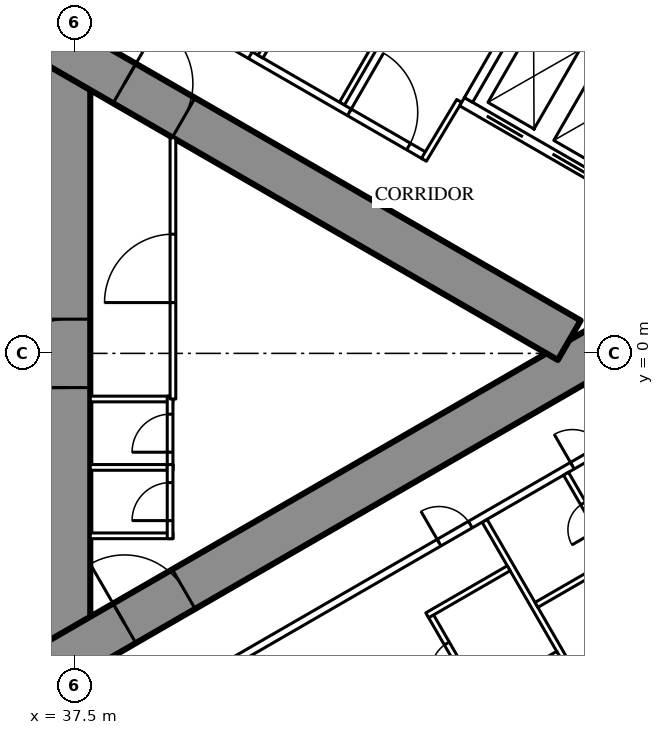
"""IFC4 building model, lengths in metres.
Left out: names, types, materials, properties, quantities, classifications, styles, units other than length and angle.
Written with IfcOpenShell. Run it as: python <this file> out.ifc"""

import sys

from ifc_helpers import new_model, si_unit, direction, frame, frame_2d, origin, place, context, subcontext, project, spatial, rectangle, extrude, element, fill, save


model = new_model("IFC4")
c1 = context("Model", 3, precision=1e-05, world=origin(), true_north=direction((0.0, 1.0)))
c2 = subcontext(c1, "Body", "Model", "MODEL_VIEW")
j1 = project(units=[si_unit("LENGTHUNIT", "METRE"), si_unit("PLANEANGLEUNIT", "RADIAN")], contexts=[c1])
p1 = place(None, origin())
s1 = spatial("IfcSite", under=j1, at=p1, CompositionType="ELEMENT")
p2 = place(p1, origin())
s2 = spatial("IfcBuilding", under=s1, at=p2, CompositionType="ELEMENT")
p3 = place(p2, frame((0.0, 0.0, 159.8)))
s3 = spatial("IfcBuildingStorey", under=s2, at=p3, CompositionType="ELEMENT", Elevation=159.8)
p4 = place(p3, frame((37.3, -8.6, 0.0), z_axis=(0.0, 0.0, 1.0), x_axis=(0.0, 1.0, 0.0)))
e1 = element("IfcWall", 1, at=p4, inside=s3, PredefinedType="SHEAR", context=c2, shape_type="SweptSolid", body=[
    extrude(rectangle(XDim=17.2, YDim=1.2, at=frame_2d((8.6, 0.0))), origin(), (0.0, 0.0, 1.0), 3.5),
])
p5 = place(p4, frame((7.7, 0.0, 0.0)))
e2 = element("IfcOpeningElement", 2, at=p5, cuts=e1, PredefinedType="OPENING", context=c2, shape_type="SweptSolid", body=[
    extrude(rectangle(XDim=1.8, YDim=2.2, at=frame_2d((0.9, 1.1))), frame((0.0, 0.61, 0.0), z_axis=(0.0, -1.0, 0.0), x_axis=(1.0, 0.0, 0.0)), (0.0, 0.0, 1.0), 1.22),
])
p6 = place(p3, frame((27.2, -13.8, 0.0), z_axis=(0.0, 0.0, 1.0), x_axis=(0.866027159892, 0.499996958321, 0.0)))
e3 = element("IfcWall", 3, at=p6, inside=s3, PredefinedType="SHEAR", context=c2, shape_type="SweptSolid", body=[
    extrude(rectangle(XDim=27.947, YDim=1.2, at=frame_2d((13.973, 0.0))), origin(), (0.0, 0.0, 1.0), 3.5),
])
p7 = place(p6, frame((4.6, 0.0, 0.0)))
e4 = element("IfcOpeningElement", 4, at=p7, cuts=e3, PredefinedType="OPENING", context=c2, shape_type="SweptSolid", body=[
    extrude(rectangle(XDim=1.0, YDim=2.2, at=frame_2d((0.5, 1.1))), frame((0.0, 0.61, 0.0), z_axis=(0.0, -1.0, 0.0), x_axis=(1.0, 0.0, 0.0)), (0.0, 0.0, 1.0), 1.22),
])
p8 = place(p6, frame((13.395, 0.0, 0.0)))
e5 = element("IfcOpeningElement", 5, at=p8, cuts=e3, PredefinedType="OPENING", context=c2, shape_type="SweptSolid", body=[
    extrude(rectangle(XDim=1.8, YDim=2.2, at=frame_2d((0.9, 1.1))), frame((0.0, 0.61, 0.0), z_axis=(0.0, -1.0, 0.0), x_axis=(1.0, 0.0, 0.0)), (0.0, 0.0, 1.0), 1.22),
])
p9 = place(p3, frame((27.2, 13.8, 0.0), z_axis=(0.0, 0.0, 1.0), x_axis=(0.866024515034, -0.500001539357, 0.0)))
e6 = element("IfcWall", 6, at=p9, inside=s3, PredefinedType="SHEAR", context=c2, shape_type="SweptSolid", body=[
    extrude(rectangle(XDim=26.907, YDim=1.2, at=frame_2d((13.454, 0.0))), origin(), (0.0, 0.0, 1.0), 3.5),
])
p10 = place(p9, frame((4.6, 0.0, 0.0)))
e7 = element("IfcOpeningElement", 7, at=p10, cuts=e6, PredefinedType="OPENING", context=c2, shape_type="SweptSolid", body=[
    extrude(rectangle(XDim=1.0, YDim=2.2, at=frame_2d((0.5, 1.1))), frame((0.0, 0.61, 0.0), z_axis=(0.0, -1.0, 0.0), x_axis=(1.0, 0.0, 0.0)), (0.0, 0.0, 1.0), 1.22),
])
p11 = place(p9, frame((13.395, 0.0, 0.0)))
e8 = element("IfcOpeningElement", 8, at=p11, cuts=e6, PredefinedType="OPENING", context=c2, shape_type="SweptSolid", body=[
    extrude(rectangle(XDim=1.8, YDim=2.2, at=frame_2d((0.9, 1.1))), frame((0.0, 0.61, 0.0), z_axis=(0.0, -1.0, 0.0), x_axis=(1.0, 0.0, 0.0)), (0.0, 0.0, 1.0), 1.22),
])
p12 = place(p3, frame((48.275, -4.404, 0.0), z_axis=(0.0, 0.0, 1.0), x_axis=(0.500006004368, -0.866021937133, 0.0)))
e9 = element("IfcWall", 9, at=p12, inside=s3, PredefinedType="PARTITIONING", context=c2, shape_type="SweptSolid", body=[
    extrude(rectangle(XDim=7.279, YDim=0.15, at=frame_2d((3.64, 0.0))), origin(), (0.0, 0.0, 1.0), 2.3),
])
p13 = place(p3, frame((44.521, 6.571, 0.0), z_axis=(0.0, 0.0, 1.0), x_axis=(0.500020376429, 0.866013639128, 0.0)))
e10 = element("IfcWall", 10, at=p13, inside=s3, PredefinedType="PARTITIONING", context=c2, shape_type="SweptSolid", body=[
    extrude(rectangle(XDim=7.306, YDim=0.15, at=frame_2d((3.653, 0.0))), origin(), (0.0, 0.0, 1.0), 2.3),
])
p14 = place(p3, frame((36.834, 10.894, 0.0), z_axis=(0.0, 0.0, 1.0), x_axis=(0.866031655879, -0.499989170898, 0.0)))
e11 = element("IfcWall", 11, at=p14, inside=s3, PredefinedType="PARTITIONING", context=c2, shape_type="SweptSolid", body=[
    extrude(rectangle(XDim=11.41, YDim=0.2, at=frame_2d((5.705, 0.0))), origin(), (0.0, 0.0, 1.0), 3.25),
])
p15 = place(p14, frame((5.144, 0.0, 0.0)))
e12 = element("IfcOpeningElement", 12, at=p15, cuts=e11, PredefinedType="OPENING", context=c2, shape_type="SweptSolid", body=[
    extrude(rectangle(XDim=0.95, YDim=2.2, at=frame_2d((0.475, 1.1))), frame((0.0, 0.11, 0.0), z_axis=(0.0, -1.0, 0.0), x_axis=(1.0, 0.0, 0.0)), (0.0, 0.0, 1.0), 0.22),
])
p16 = place(p14, frame((3.161, 0.0, 0.0)))
e13 = element("IfcOpeningElement", 13, at=p16, cuts=e11, PredefinedType="OPENING", context=c2, shape_type="SweptSolid", body=[
    extrude(rectangle(XDim=0.95, YDim=2.2, at=frame_2d((0.475, 1.1))), frame((0.0, 0.11, 0.0), z_axis=(0.0, -1.0, 0.0), x_axis=(1.0, 0.0, 0.0)), (0.0, 0.0, 1.0), 0.22),
])
p17 = place(p14, frame((9.102, 0.0, 0.0)))
e14 = element("IfcOpeningElement", 14, at=p17, cuts=e11, PredefinedType="OPENING", context=c2, shape_type="SweptSolid", body=[
    extrude(rectangle(XDim=1.8, YDim=2.2, at=frame_2d((0.9, 1.1))), frame((0.0, 0.11, 0.0), z_axis=(0.0, -1.0, 0.0), x_axis=(1.0, 0.0, 0.0)), (0.0, 0.0, 1.0), 0.22),
])
p18 = place(p3, frame((47.606, 6.643, 0.0), z_axis=(0.0, 0.0, 1.0), x_axis=(-0.514237157483, -0.857648031458, 0.0)))
e15 = element("IfcWall", 15, at=p18, inside=s3, PredefinedType="PARTITIONING", context=c2, shape_type="SweptSolid", body=[
    extrude(rectangle(XDim=1.805, YDim=0.15, at=frame_2d((0.902, 0.0))), origin(), (0.0, 0.0, 1.0), 3.25),
])
p19 = place(p3, frame((40.741, -8.638, 0.0), z_axis=(0.0, 0.0, 1.0), x_axis=(0.866022967338, 0.500004220025, 0.0)))
e16 = element("IfcWall", 16, at=p19, inside=s3, PredefinedType="PARTITIONING", context=c2, shape_type="SweptSolid", body=[
    extrude(rectangle(XDim=17.276, YDim=0.2, at=frame_2d((8.638, 0.0))), origin(), (0.0, 0.0, 1.0), 3.25),
])
p20 = place(p19, frame((7.316, 0.0, 0.0)))
e17 = element("IfcOpeningElement", 17, at=p20, cuts=e16, PredefinedType="OPENING", context=c2, shape_type="SweptSolid", body=[
    extrude(rectangle(XDim=0.95, YDim=2.2, at=frame_2d((0.475, 1.1))), frame((0.0, 0.11, 0.0), z_axis=(0.0, -1.0, 0.0), x_axis=(1.0, 0.0, 0.0)), (0.0, 0.0, 1.0), 0.22),
])
p21 = place(p19, frame((11.366, 0.0, 0.0)))
e18 = element("IfcOpeningElement", 18, at=p21, cuts=e16, PredefinedType="OPENING", context=c2, shape_type="SweptSolid", body=[
    extrude(rectangle(XDim=0.95, YDim=2.2, at=frame_2d((0.475, 1.1))), frame((0.0, 0.11, 0.0), z_axis=(0.0, -1.0, 0.0), x_axis=(1.0, 0.0, 0.0)), (0.0, 0.0, 1.0), 0.22),
])
p22 = place(p19, frame((13.347, 0.0, 0.0)))
e19 = element("IfcOpeningElement", 19, at=p22, cuts=e16, PredefinedType="OPENING", context=c2, shape_type="SweptSolid", body=[
    extrude(rectangle(XDim=0.95, YDim=2.2, at=frame_2d((0.475, 1.1))), frame((0.0, 0.11, 0.0), z_axis=(0.0, -1.0, 0.0), x_axis=(1.0, 0.0, 0.0)), (0.0, 0.0, 1.0), 0.22),
])
p23 = place(p3, frame((48.066, -9.143, 0.0), z_axis=(0.0, 0.0, 1.0), x_axis=(0.866006523861, 0.500032699561, 0.0)))
e20 = element("IfcWall", 20, at=p23, inside=s3, PredefinedType="PARTITIONING", context=c2, shape_type="SweptSolid", body=[
    extrude(rectangle(XDim=2.475, YDim=0.15, at=frame_2d((1.237, 0.0))), origin(), (0.0, 0.0, 1.0), 3.25),
])
p24 = place(p3, frame((46.831, -6.854, 0.0), z_axis=(0.0, 0.0, 1.0), x_axis=(0.500006934395, -0.866021400173, 0.0)))
e21 = element("IfcWall", 21, at=p24, inside=s3, PredefinedType="PARTITIONING", context=c2, shape_type="SweptSolid", body=[
    extrude(rectangle(XDim=2.6, YDim=0.15, at=frame_2d((1.3, 0.0))), origin(), (0.0, 0.0, 1.0), 3.25),
])
p25 = place(p24, frame((0.9, 0.0, 0.0)))
e22 = element("IfcOpeningElement", 22, at=p25, cuts=e21, PredefinedType="OPENING", context=c2, shape_type="SweptSolid", body=[
    extrude(rectangle(XDim=0.8, YDim=2.2, at=frame_2d((0.4, 1.1))), frame((0.0, 0.085, 0.0), z_axis=(0.0, -1.0, 0.0), x_axis=(1.0, 0.0, 0.0)), (0.0, 0.0, 1.0), 0.17),
])
for number, where, z_axis, x_axis in (
    (23, (46.766, -6.891, 0.0), (0.0, 0.0, 1.0), (0.866, 0.5, 0.0)),
    (24, (49.64, -6.618, 0.0), (0.0, 0.0, 1.0), (0.866, 0.5, 0.0)),
):
    element("IfcWall", number, at=place(p3, frame(where, z_axis=z_axis, x_axis=x_axis)), inside=s3, PredefinedType="PARTITIONING", context=c2, shape_type="SweptSolid", body=[
        extrude(rectangle(XDim=2.475, YDim=0.15, at=frame_2d((1.237, 0.0))), origin(), (0.0, 0.0, 1.0), 3.25),
    ])
p26 = place(p3, frame((50.418, -3.166, 0.0), z_axis=(0.0, 0.0, 1.0), x_axis=(0.499936506574, -0.866062058628, 0.0)))
e25 = element("IfcWall", 25, at=p26, inside=s3, PredefinedType="PARTITIONING", context=c2, shape_type="SweptSolid", body=[
    extrude(rectangle(XDim=2.6, YDim=0.15, at=frame_2d((1.3, 0.0))), origin(), (0.0, 0.0, 1.0), 3.25),
])
p27 = place(p26, frame((0.9, 0.0, 0.0)))
e26 = element("IfcOpeningElement", 26, at=p27, cuts=e25, PredefinedType="OPENING", context=c2, shape_type="SweptSolid", body=[
    extrude(rectangle(XDim=0.8, YDim=2.2, at=frame_2d((0.4, 1.1))), frame((0.0, 0.085, 0.0), z_axis=(0.0, -1.0, 0.0), x_axis=(1.0, 0.0, 0.0)), (0.0, 0.0, 1.0), 0.17),
])
p28 = place(p3, frame((42.378, 7.808, 0.0), z_axis=(0.0, 0.0, 1.0), x_axis=(0.500006934395, 0.866021400173, 0.0)))
e27 = element("IfcWall", 27, at=p28, inside=s3, PredefinedType="PARTITIONING", context=c2, shape_type="SweptSolid", body=[
    extrude(rectangle(XDim=2.6, YDim=0.15, at=frame_2d((1.3, 0.0))), origin(), (0.0, 0.0, 1.0), 3.25),
])
p29 = place(p28, frame((0.9, 0.0, 0.0)))
e28 = element("IfcOpeningElement", 28, at=p29, cuts=e27, PredefinedType="OPENING", context=c2, shape_type="SweptSolid", body=[
    extrude(rectangle(XDim=0.8, YDim=2.2, at=frame_2d((0.4, 1.1))), frame((0.0, 0.085, 0.0), z_axis=(0.0, -1.0, 0.0), x_axis=(1.0, 0.0, 0.0)), (0.0, 0.0, 1.0), 0.17),
])
for number, where, z_axis, x_axis in (
    (29, (37.9, -1.2, 0.0), (0.0, 0.0, 1.0), (1.0, 0.0, 0.0)),
    (30, (37.9, -3.0, 0.0), (0.0, 0.0, 1.0), (1.0, 0.0, 0.0)),
    (31, (37.9, -4.8, 0.0), (0.0, 0.0, 1.0), (1.0, 0.0, 0.0)),
):
    element("IfcWall", number, at=place(p3, frame(where, z_axis=z_axis, x_axis=x_axis)), inside=s3, PredefinedType="PARTITIONING", context=c2, shape_type="SweptSolid", body=[
        extrude(rectangle(XDim=2.175, YDim=0.15, at=frame_2d((1.087, 0.0))), origin(), (0.0, 0.0, 1.0), 3.25),
    ])
p30 = place(p3, frame((40.0, -3.075, 0.0), z_axis=(0.0, 0.0, 1.0), x_axis=(0.0, 1.0, 0.0)))
e32 = element("IfcWall", 32, at=p30, inside=s3, PredefinedType="PARTITIONING", context=c2, shape_type="SweptSolid", body=[
    extrude(rectangle(XDim=1.95, YDim=0.15, at=frame_2d((0.975, 0.0))), origin(), (0.0, 0.0, 1.0), 3.25),
])
p31 = place(p30, frame((0.475, 0.0, 0.0)))
e33 = element("IfcOpeningElement", 33, at=p31, cuts=e32, PredefinedType="OPENING", context=c2, shape_type="SweptSolid", body=[
    extrude(rectangle(XDim=1.0, YDim=2.2, at=frame_2d((0.5, 1.1))), frame((0.0, 0.085, 0.0), z_axis=(0.0, -1.0, 0.0), x_axis=(1.0, 0.0, 0.0)), (0.0, 0.0, 1.0), 0.17),
])
p32 = place(p3, frame((40.0, -4.875, 0.0), z_axis=(0.0, 0.0, 1.0), x_axis=(0.0, 1.0, 0.0)))
e34 = element("IfcWall", 34, at=p32, inside=s3, PredefinedType="PARTITIONING", context=c2, shape_type="SweptSolid", body=[
    extrude(rectangle(XDim=1.95, YDim=0.15, at=frame_2d((0.975, 0.0))), origin(), (0.0, 0.0, 1.0), 3.25),
])
p33 = place(p32, frame((0.475, 0.0, 0.0)))
e35 = element("IfcOpeningElement", 35, at=p33, cuts=e34, PredefinedType="OPENING", context=c2, shape_type="SweptSolid", body=[
    extrude(rectangle(XDim=1.0, YDim=2.2, at=frame_2d((0.5, 1.1))), frame((0.0, 0.085, 0.0), z_axis=(0.0, -1.0, 0.0), x_axis=(1.0, 0.0, 0.0)), (0.0, 0.0, 1.0), 0.17),
])
p34 = place(p3, frame((40.075, -1.2, 0.0), z_axis=(0.0, 0.0, 1.0), x_axis=(0.0, 1.0, 0.0)))
e36 = element("IfcWall", 36, at=p34, inside=s3, PredefinedType="PARTITIONING", context=c2, shape_type="SweptSolid", body=[
    extrude(rectangle(XDim=6.874, YDim=0.15, at=frame_2d((3.437, 0.0))), origin(), (0.0, 0.0, 1.0), 3.25),
])
p35 = place(p34, frame((2.537, 0.0, 0.0)))
e37 = element("IfcOpeningElement", 37, at=p35, cuts=e36, PredefinedType="OPENING", context=c2, shape_type="SweptSolid", body=[
    extrude(rectangle(XDim=1.8, YDim=2.2, at=frame_2d((0.9, 1.1))), frame((0.0, 0.085, 0.0), z_axis=(0.0, -1.0, 0.0), x_axis=(1.0, 0.0, 0.0)), (0.0, 0.0, 1.0), 0.17),
])
p36 = place(p3, frame((47.681, 6.622, 0.0), z_axis=(0.0, 0.0, 1.0), x_axis=(0.86603344179, -0.499986077507, 0.0)))
e38 = element("IfcWall", 38, at=p36, inside=s3, PredefinedType="PARTITIONING", context=c2, shape_type="SweptSolid", body=[
    extrude(rectangle(XDim=6.6, YDim=0.25, at=frame_2d((3.3, 0.0))), origin(), (0.0, 0.0, 1.0), 3.25),
])
p37 = place(p36, frame((0.75, 0.0, 0.0)))
e39 = element("IfcOpeningElement", 39, at=p37, cuts=e38, PredefinedType="OPENING", context=c2, shape_type="SweptSolid", body=[
    extrude(rectangle(XDim=1.1, YDim=2.2, at=frame_2d((0.55, 1.1))), frame((0.0, 0.135, 0.0), z_axis=(0.0, -1.0, 0.0), x_axis=(1.0, 0.0, 0.0)), (0.0, 0.0, 1.0), 0.27),
])
p38 = place(p36, frame((2.75, 0.0, 0.0)))
e40 = element("IfcOpeningElement", 40, at=p38, cuts=e38, PredefinedType="OPENING", context=c2, shape_type="SweptSolid", body=[
    extrude(rectangle(XDim=1.1, YDim=2.2, at=frame_2d((0.55, 1.1))), frame((0.0, 0.135, 0.0), z_axis=(0.0, -1.0, 0.0), x_axis=(1.0, 0.0, 0.0)), (0.0, 0.0, 1.0), 0.27),
])
p39 = place(p36, frame((4.75, 0.0, 0.0)))
e41 = element("IfcOpeningElement", 41, at=p39, cuts=e38, PredefinedType="OPENING", context=c2, shape_type="SweptSolid", body=[
    extrude(rectangle(XDim=1.1, YDim=2.2, at=frame_2d((0.55, 1.1))), frame((0.0, 0.135, 0.0), z_axis=(0.0, -1.0, 0.0), x_axis=(1.0, 0.0, 0.0)), (0.0, 0.0, 1.0), 0.27),
])
p40 = place(p3, frame((49.406, 9.611, 0.0), z_axis=(0.0, 0.0, 1.0), x_axis=(0.86603344179, -0.499986077507, 0.0)))
e42 = element("IfcWall", 42, at=p40, inside=s3, PredefinedType="PARTITIONING", context=c2, shape_type="SweptSolid", body=[
    extrude(rectangle(XDim=6.6, YDim=0.25, at=frame_2d((3.3, 0.0))), origin(), (0.0, 0.0, 1.0), 3.25),
])
p41 = place(p3, frame((47.852, 6.668, 0.0), z_axis=(0.0, 0.0, 1.0), x_axis=(0.499929347863, 0.866066190972, 0.0)))
e43 = element("IfcWall", 43, at=p41, inside=s3, PredefinedType="PARTITIONING", context=c2, shape_type="SweptSolid", body=[
    extrude(rectangle(XDim=3.201, YDim=0.25, at=frame_2d((1.6, 0.0))), origin(), (0.0, 0.0, 1.0), 3.25),
])
p42 = place(p25, origin())
e44 = element("IfcDoor", 44, at=p42, inside=s3, OperationType="SINGLE_SWING_RIGHT", PredefinedType="DOOR", context=c2, shape_type="SweptSolid", body=[
    extrude(rectangle(XDim=0.8, YDim=2.2, at=frame_2d((0.4, 1.1))), frame((0.0, 0.025, 0.0), z_axis=(0.0, -1.0, 0.0), x_axis=(1.0, 0.0, 0.0)), (0.0, 0.0, 1.0), 0.05),
])
fill(e22, e44)
p43 = place(p20, origin())
e45 = element("IfcDoor", 45, at=p43, inside=s3, OperationType="SINGLE_SWING_LEFT", PredefinedType="DOOR", context=c2, shape_type="SweptSolid", body=[
    extrude(rectangle(XDim=0.95, YDim=2.2, at=frame_2d((0.475, 1.1))), frame((0.0, 0.025, 0.0), z_axis=(0.0, -1.0, 0.0), x_axis=(1.0, 0.0, 0.0)), (0.0, 0.0, 1.0), 0.05),
])
fill(e17, e45)
p44 = place(p27, origin())
e46 = element("IfcDoor", 46, at=p44, inside=s3, OperationType="SINGLE_SWING_RIGHT", PredefinedType="DOOR", context=c2, shape_type="SweptSolid", body=[
    extrude(rectangle(XDim=0.8, YDim=2.2, at=frame_2d((0.4, 1.1))), frame((0.0, 0.025, 0.0), z_axis=(0.0, -1.0, 0.0), x_axis=(1.0, 0.0, 0.0)), (0.0, 0.0, 1.0), 0.05),
])
fill(e26, e46)
p45 = place(p21, origin())
e47 = element("IfcDoor", 47, at=p45, inside=s3, OperationType="SINGLE_SWING_LEFT", PredefinedType="DOOR", context=c2, shape_type="SweptSolid", body=[
    extrude(rectangle(XDim=0.95, YDim=2.2, at=frame_2d((0.475, 1.1))), frame((0.0, 0.025, 0.0), z_axis=(0.0, -1.0, 0.0), x_axis=(1.0, 0.0, 0.0)), (0.0, 0.0, 1.0), 0.05),
])
fill(e18, e47)
p46 = place(p15, origin())
e48 = element("IfcDoor", 48, at=p46, inside=s3, OperationType="SINGLE_SWING_LEFT", PredefinedType="DOOR", context=c2, shape_type="SweptSolid", body=[
    extrude(rectangle(XDim=0.95, YDim=2.2, at=frame_2d((0.475, 1.1))), frame((0.0, 0.025, 0.0), z_axis=(0.0, -1.0, 0.0), x_axis=(1.0, 0.0, 0.0)), (0.0, 0.0, 1.0), 0.05),
])
fill(e12, e48)
p47 = place(p17, origin())
e49 = element("IfcDoor", 49, at=p47, inside=s3, OperationType="DOUBLE_DOOR_SINGLE_SWING", PredefinedType="DOOR", context=c2, shape_type="SweptSolid", body=[
    extrude(rectangle(XDim=1.8, YDim=2.2, at=frame_2d((0.9, 1.1))), frame((0.0, 0.025, 0.0), z_axis=(0.0, -1.0, 0.0), x_axis=(1.0, 0.0, 0.0)), (0.0, 0.0, 1.0), 0.05),
])
fill(e14, e49)
p48 = place(p31, origin())
e50 = element("IfcDoor", 50, at=p48, inside=s3, OperationType="SINGLE_SWING_LEFT", PredefinedType="DOOR", context=c2, shape_type="SweptSolid", body=[
    extrude(rectangle(XDim=1.0, YDim=2.2, at=frame_2d((0.5, 1.1))), frame((0.0, 0.025, 0.0), z_axis=(0.0, -1.0, 0.0), x_axis=(1.0, 0.0, 0.0)), (0.0, 0.0, 1.0), 0.05),
])
fill(e33, e50)
p49 = place(p33, origin())
e51 = element("IfcDoor", 51, at=p49, inside=s3, OperationType="SINGLE_SWING_LEFT", PredefinedType="DOOR", context=c2, shape_type="SweptSolid", body=[
    extrude(rectangle(XDim=1.0, YDim=2.2, at=frame_2d((0.5, 1.1))), frame((0.0, 0.025, 0.0), z_axis=(0.0, -1.0, 0.0), x_axis=(1.0, 0.0, 0.0)), (0.0, 0.0, 1.0), 0.05),
])
fill(e35, e51)
p50 = place(p35, origin())
e52 = element("IfcDoor", 52, at=p50, inside=s3, OperationType="DOUBLE_DOOR_SINGLE_SWING", PredefinedType="DOOR", context=c2, shape_type="SweptSolid", body=[
    extrude(rectangle(XDim=1.8, YDim=2.2, at=frame_2d((0.9, 1.1))), frame((0.0, 0.025, 0.0), z_axis=(0.0, -1.0, 0.0), x_axis=(1.0, 0.0, 0.0)), (0.0, 0.0, 1.0), 0.05),
])
fill(e37, e52)
p51 = place(p8, origin())
e53 = element("IfcDoor", 53, at=p51, inside=s3, OperationType="DOUBLE_DOOR_SINGLE_SWING", PredefinedType="DOOR", context=c2, shape_type="SweptSolid", body=[
    extrude(rectangle(XDim=1.8, YDim=2.2, at=frame_2d((0.9, 1.1))), frame((0.0, 0.025, 0.0), z_axis=(0.0, -1.0, 0.0), x_axis=(1.0, 0.0, 0.0)), (0.0, 0.0, 1.0), 0.05),
])
fill(e5, e53)
p52 = place(p11, origin())
e54 = element("IfcDoor", 54, at=p52, inside=s3, OperationType="DOUBLE_DOOR_SINGLE_SWING", PredefinedType="DOOR", context=c2, shape_type="SweptSolid", body=[
    extrude(rectangle(XDim=1.8, YDim=2.2, at=frame_2d((0.9, 1.1))), frame((0.0, 0.025, 0.0), z_axis=(0.0, -1.0, 0.0), x_axis=(1.0, 0.0, 0.0)), (0.0, 0.0, 1.0), 0.05),
])
fill(e8, e54)
p53 = place(p5, origin())
e55 = element("IfcDoor", 55, at=p53, inside=s3, OperationType="DOUBLE_DOOR_SINGLE_SWING", PredefinedType="DOOR", context=c2, shape_type="SweptSolid", body=[
    extrude(rectangle(XDim=1.8, YDim=2.2, at=frame_2d((0.9, 1.1))), frame((0.0, 0.025, 0.0), z_axis=(0.0, -1.0, 0.0), x_axis=(1.0, 0.0, 0.0)), (0.0, 0.0, 1.0), 0.05),
])
fill(e2, e55)
p54 = place(p37, origin())
e56 = element("IfcDoor", 56, at=p54, inside=s3, OperationType="DOUBLE_DOOR_SLIDING", PredefinedType="USERDEFINED", context=c2, shape_type="SweptSolid", body=[
    extrude(rectangle(XDim=1.1, YDim=2.2, at=frame_2d((0.55, 1.1))), frame((0.0, 0.025, 0.0), z_axis=(0.0, -1.0, 0.0), x_axis=(1.0, 0.0, 0.0)), (0.0, 0.0, 1.0), 0.05),
])
fill(e39, e56)
p55 = place(p38, origin())
e57 = element("IfcDoor", 57, at=p55, inside=s3, OperationType="DOUBLE_DOOR_SLIDING", PredefinedType="USERDEFINED", context=c2, shape_type="SweptSolid", body=[
    extrude(rectangle(XDim=1.1, YDim=2.2, at=frame_2d((0.55, 1.1))), frame((0.0, 0.025, 0.0), z_axis=(0.0, -1.0, 0.0), x_axis=(1.0, 0.0, 0.0)), (0.0, 0.0, 1.0), 0.05),
])
fill(e40, e57)
save(model, sys.argv[1])
